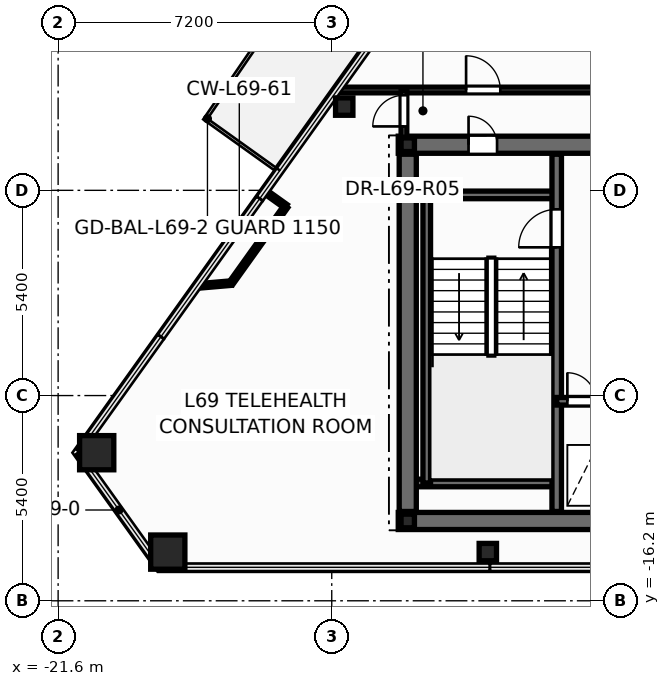
"""IFC4 building model, lengths in metres.
Left out: names, types, materials, properties, quantities, classifications, styles, units other than length and angle.
Written with IfcOpenShell. Run it as: python <this file> out.ifc"""

import sys

from ifc_helpers import new_model, si_unit, direction, frame, frame_2d, origin, origin_2d, place, context, subcontext, project, spatial, rectangle, hollow_rectangle, hollow_circle, i_section, extrude, element, fill, save


model = new_model("IFC4")
c1 = context("Model", 3, precision=1e-05, world=origin(), true_north=direction((0.0, 1.0)))
c2 = subcontext(c1, "Body", "Model", "MODEL_VIEW")
j1 = project(units=[si_unit("LENGTHUNIT", "METRE"), si_unit("PLANEANGLEUNIT", "RADIAN")], contexts=[c1])
p1 = place(None, origin())
s1 = spatial("IfcSite", under=j1, at=p1, CompositionType="ELEMENT")
p2 = place(p1, origin())
s2 = spatial("IfcBuilding", under=s1, at=p2, CompositionType="ELEMENT")
p3 = place(p2, frame((0.0, 0.0, 263.4)))
s3 = spatial("IfcBuildingStorey", under=s2, at=p3, CompositionType="ELEMENT", Elevation=263.4)
for number, where, z_axis, x_axis in (
    (1, (-20.585, -12.303, 0.0), (0.0, 0.0, 1.0), (1.0, 0.0, 0.0)),
    (2, (-18.714, -14.919, 0.0), (0.0, 0.0, 1.0), (1.0, 0.0, 0.0)),
):
    element("IfcColumn", number, at=place(p3, frame(where, z_axis=z_axis, x_axis=x_axis)), inside=s3, PredefinedType="COLUMN", context=c2, shape_type="SweptSolid", body=[
        extrude(hollow_rectangle(XDim=0.9, YDim=0.9, WallThickness=0.04, at=origin_2d()), origin(), (0.0, 0.0, 1.0), 3.6),
    ])
for number, where, z_axis, x_axis in (
    (3, (-10.293, -14.919, 0.0), (0.0, 0.0, 1.0), (1.0, 0.0, 0.0)),
    (4, (-14.072, -3.196, 0.0), (0.0, 0.0, 1.0), (1.0, 0.0, 0.0)),
):
    element("IfcColumn", number, at=place(p3, frame(where, z_axis=z_axis, x_axis=x_axis)), inside=s3, PredefinedType="COLUMN", context=c2, shape_type="SweptSolid", body=[
        extrude(hollow_circle(Radius=0.229, WallThickness=0.016, at=origin_2d()), origin(), (0.0, 0.0, 1.0), 3.6),
    ])
for number, where, z_axis, x_axis in (
    (5, (-12.4, -14.1, 0.0), (0.0, 0.0, 1.0), (1.0, 0.0, 0.0)),
    (6, (-12.4, -4.2, 0.0), (0.0, 0.0, 1.0), (1.0, 0.0, 0.0)),
):
    element("IfcColumn", number, at=place(p3, frame(where, z_axis=z_axis, x_axis=x_axis)), inside=s3, PredefinedType="COLUMN", context=c2, shape_type="SweptSolid", body=[
        extrude(i_section(OverallWidth=0.352, OverallDepth=0.359, WebThickness=0.018, FlangeThickness=0.026, at=origin_2d()), origin(), (0.0, 0.0, 1.0), 3.6),
    ])
p4 = place(p3, frame((-12.65, -14.1, 0.0), z_axis=(0.0, 0.0, 1.0), x_axis=(1.0, 0.0, 0.0)))
e7 = element("IfcWall", 7, at=p4, inside=s3, PredefinedType="SHEAR", context=c2, shape_type="SweptSolid", body=[
    extrude(rectangle(XDim=25.3, YDim=0.45, at=frame_2d((12.65, 0.0))), origin(), (0.0, 0.0, 1.0), 3.6),
])
p5 = place(p3, frame((-12.65, -4.2, 0.0), z_axis=(0.0, 0.0, 1.0), x_axis=(1.0, 0.0, 0.0)))
e8 = element("IfcWall", 8, at=p5, inside=s3, PredefinedType="SHEAR", context=c2, shape_type="SweptSolid", body=[
    extrude(rectangle(XDim=25.3, YDim=0.45, at=frame_2d((12.65, 0.0))), origin(), (0.0, 0.0, 1.0), 3.6),
])
p6 = place(p5, frame((1.85, 0.0, 0.0)))
e9 = element("IfcOpeningElement", 9, at=p6, cuts=e8, PredefinedType="OPENING", context=c2, shape_type="SweptSolid", body=[
    extrude(rectangle(XDim=0.756, YDim=2.054, at=frame_2d((0.375, 1.027))), frame((0.0, 0.235, 0.0), z_axis=(0.0, -1.0, 0.0), x_axis=(1.0, 0.0, 0.0)), (0.0, 0.0, 1.0), 0.47),
])
p7 = place(p5, frame((22.65, 0.0, 0.0)))
e10 = element("IfcOpeningElement", 10, at=p7, cuts=e8, PredefinedType="OPENING", context=c2, shape_type="SweptSolid", body=[
    extrude(rectangle(XDim=0.756, YDim=2.054, at=frame_2d((0.375, 1.027))), frame((0.0, 0.235, 0.0), z_axis=(0.0, -1.0, 0.0), x_axis=(1.0, 0.0, 0.0)), (0.0, 0.0, 1.0), 0.47),
])
p8 = place(p5, frame((5.85, 0.0, 0.0)))
e11 = element("IfcOpeningElement", 11, at=p8, cuts=e8, PredefinedType="OPENING", context=c2, shape_type="SweptSolid", body=[
    extrude(rectangle(XDim=1.006, YDim=2.104, at=frame_2d((0.5, 1.052))), frame((0.0, 0.235, 0.0), z_axis=(0.0, -1.0, 0.0), x_axis=(1.0, 0.0, 0.0)), (0.0, 0.0, 1.0), 0.47),
])
p9 = place(p5, frame((10.35, 0.0, 0.0)))
e12 = element("IfcOpeningElement", 12, at=p9, cuts=e8, PredefinedType="OPENING", context=c2, shape_type="SweptSolid", body=[
    extrude(rectangle(XDim=1.406, YDim=2.154, at=frame_2d((0.7, 1.077))), frame((0.0, 0.235, 0.0), z_axis=(0.0, -1.0, 0.0), x_axis=(1.0, 0.0, 0.0)), (0.0, 0.0, 1.0), 0.47),
])
p10 = place(p5, frame((18.45, 0.0, 0.0)))
e13 = element("IfcOpeningElement", 13, at=p10, cuts=e8, PredefinedType="OPENING", context=c2, shape_type="SweptSolid", body=[
    extrude(rectangle(XDim=1.006, YDim=2.104, at=frame_2d((0.5, 1.052))), frame((0.0, 0.235, 0.0), z_axis=(0.0, -1.0, 0.0), x_axis=(1.0, 0.0, 0.0)), (0.0, 0.0, 1.0), 0.47),
])
for number, where, z_axis, x_axis in (
    (14, (-12.35, -5.52, 0.0), (0.0, 0.0, 1.0), (1.0, 0.0, 0.0)),
    (15, (-12.35, -13.1, 0.0), (0.0, 0.0, 1.0), (1.0, 0.0, 0.0)),
):
    element("IfcWall", number, at=place(p3, frame(where, z_axis=z_axis, x_axis=x_axis)), inside=s3, PredefinedType="SOLIDWALL", context=c2, shape_type="SweptSolid", body=[
        extrude(rectangle(XDim=3.87, YDim=0.2, at=frame_2d((1.935, 0.0))), origin(), (0.0, 0.0, 1.0), 3.6),
    ])
p11 = place(p3, frame((-11.9, -13.1, 0.0), z_axis=(0.0, 0.0, 1.0), x_axis=(0.0, 1.0, 0.0)))
e16 = element("IfcWall", 16, at=p11, inside=s3, PredefinedType="SOLIDWALL", context=c2, shape_type="SweptSolid", body=[
    extrude(rectangle(XDim=7.58, YDim=0.2, at=frame_2d((3.79, 0.0))), origin(), (0.0, 0.0, 1.0), 3.6),
])
p12 = place(p3, frame((-8.48, -13.85, 0.0), z_axis=(0.0, 0.0, 1.0), x_axis=(0.0, 1.0, 0.0)))
e17 = element("IfcWall", 17, at=p12, inside=s3, PredefinedType="SHEAR", context=c2, shape_type="SweptSolid", body=[
    extrude(rectangle(XDim=9.4, YDim=0.25, at=frame_2d((4.7, 0.0))), origin(), (0.0, 0.0, 1.0), 3.6),
])
p13 = place(p12, frame((6.95, 0.0, 0.0)))
e18 = element("IfcOpeningElement", 18, at=p13, cuts=e17, PredefinedType="OPENING", context=c2, shape_type="SweptSolid", body=[
    extrude(rectangle(XDim=1.006, YDim=2.104, at=frame_2d((0.5, 1.052))), frame((0.0, 0.135, 0.0), z_axis=(0.0, -1.0, 0.0), x_axis=(1.0, 0.0, 0.0)), (0.0, 0.0, 1.0), 0.27),
])
p14 = place(p3, frame((-8.48, -10.95, 0.0), z_axis=(0.0, 0.0, 1.0), x_axis=(1.0, 0.0, 0.0)))
e19 = element("IfcWall", 19, at=p14, inside=s3, PredefinedType="SOLIDWALL", context=c2, shape_type="SweptSolid", body=[
    extrude(rectangle(XDim=3.36, YDim=0.2, at=frame_2d((1.68, 0.0))), origin(), (0.0, 0.0, 1.0), 3.6),
])
p15 = place(p14, frame((0.28, 0.0, 0.0)))
e20 = element("IfcOpeningElement", 20, at=p15, cuts=e19, PredefinedType="OPENING", context=c2, shape_type="SweptSolid", body=[
    extrude(rectangle(XDim=0.756, YDim=2.054, at=frame_2d((0.375, 1.027))), frame((0.0, 0.11, 0.0), z_axis=(0.0, -1.0, 0.0), x_axis=(1.0, 0.0, 0.0)), (0.0, 0.0, 1.0), 0.22),
])
p16 = place(p14, frame((1.85, 0.0, 0.0)))
e21 = element("IfcOpeningElement", 21, at=p16, cuts=e19, PredefinedType="OPENING", context=c2, shape_type="SweptSolid", body=[
    extrude(rectangle(XDim=1.106, YDim=2.104, at=frame_2d((0.55, 1.052))), frame((0.0, 0.11, 0.0), z_axis=(0.0, -1.0, 0.0), x_axis=(1.0, 0.0, 0.0)), (0.0, 0.0, 1.0), 0.22),
])
p17 = place(p3, frame((-12.4, -13.85, 0.0), z_axis=(0.0, 0.0, 1.0), x_axis=(0.0, 1.0, 0.0)))
e22 = element("IfcWall", 22, at=p17, inside=s3, PredefinedType="SHEAR", context=c2, shape_type="SweptSolid", body=[
    extrude(rectangle(XDim=9.4, YDim=0.45, at=frame_2d((4.7, 0.0))), origin(), (0.0, 0.0, 1.0), 3.6),
])
p18 = place(p3, frame((-14.251, -2.76, 0.0), z_axis=(0.0, 0.0, 1.0), x_axis=(1.0, 0.0, 0.0)))
e23 = element("IfcWall", 23, at=p18, inside=s3, PredefinedType="PARTITIONING", context=c2, shape_type="SweptSolid", body=[
    extrude(rectangle(XDim=9.351, YDim=0.15, at=frame_2d((4.676, 0.0))), origin(), (0.0, 0.0, 1.0), 2.32),
])
p19 = place(p18, frame((3.386, 0.0, 0.0)))
e24 = element("IfcOpeningElement", 24, at=p19, cuts=e23, PredefinedType="OPENING", context=c2, shape_type="SweptSolid", body=[
    extrude(rectangle(XDim=0.906, YDim=2.104, at=frame_2d((0.45, 1.052))), frame((0.0, 0.085, 0.0), z_axis=(0.0, -1.0, 0.0), x_axis=(1.0, 0.0, 0.0)), (0.0, 0.0, 1.0), 0.17),
])
p20 = place(p3, frame((-15.606, -5.824, 0.0), z_axis=(0.0, 0.0, 1.0), x_axis=(-0.581685079242, -0.813414081872, 0.0)))
e25 = element("IfcWall", 25, at=p20, inside=s3, PredefinedType="PARTITIONING", context=c2, shape_type="SweptSolid", body=[
    extrude(rectangle(XDim=2.48, YDim=0.12, at=frame_2d((1.24, 0.0))), origin(), (0.0, 0.0, 1.0), 3.345),
])
p21 = place(p3, frame((-12.5, -4.24, 0.0), z_axis=(0.0, 0.0, 1.0), x_axis=(0.0, 1.0, 0.0)))
e26 = element("IfcWall", 26, at=p21, inside=s3, PredefinedType="PARTITIONING", context=c2, shape_type="SweptSolid", body=[
    extrude(rectangle(XDim=1.48, YDim=0.15, at=frame_2d((0.74, 0.0))), origin(), (0.0, 0.0, 1.0), 2.32),
])
p22 = place(p21, frame((0.522, 0.0, 0.0)))
e27 = element("IfcOpeningElement", 27, at=p22, cuts=e26, PredefinedType="OPENING", context=c2, shape_type="SweptSolid", body=[
    extrude(rectangle(XDim=0.826, YDim=2.104, at=frame_2d((0.41, 1.052))), frame((0.0, 0.085, 0.0), z_axis=(0.0, -1.0, 0.0), x_axis=(1.0, 0.0, 0.0)), (0.0, 0.0, 1.0), 0.17),
])
p23 = place(p3, frame((-17.049, -7.841, 0.0), z_axis=(0.0, 0.0, 1.0), x_axis=(-0.996304768975, -0.085888342153, 0.0)))
e28 = element("IfcWall", 28, at=p23, inside=s3, PredefinedType="PARTITIONING", context=c2, shape_type="SweptSolid", body=[
    extrude(rectangle(XDim=0.881, YDim=0.12, at=frame_2d((0.44, 0.0))), origin(), (0.0, 0.0, 1.0), 2.863),
])
p24 = place(p3, frame((-16.151, -5.434, 0.0), z_axis=(0.0, 0.0, 1.0), x_axis=(0.813265440227, -0.581892879947, 0.0)))
e29 = element("IfcWall", 29, at=p24, inside=s3, PredefinedType="PARTITIONING", context=c2, shape_type="SweptSolid", body=[
    extrude(rectangle(XDim=0.67, YDim=0.12, at=frame_2d((0.335, 0.0))), origin(), (0.0, 0.0, 1.0), 2.863),
])
p25 = place(p13, origin())
e30 = element("IfcDoor", 30, at=p25, inside=s3, OperationType="SINGLE_SWING_LEFT", PredefinedType="DOOR", context=c2, shape_type="SweptSolid", body=[
    extrude(rectangle(XDim=1.0, YDim=2.1, at=frame_2d((0.5, 1.05))), frame((0.0, 0.025, 0.0), z_axis=(0.0, -1.0, 0.0), x_axis=(1.0, 0.0, 0.0)), (0.0, 0.0, 1.0), 0.05),
])
fill(e18, e30)
p26 = place(p15, origin())
e31 = element("IfcDoor", 31, at=p26, inside=s3, OperationType="SINGLE_SWING_LEFT", PredefinedType="DOOR", context=c2, shape_type="SweptSolid", body=[
    extrude(rectangle(XDim=0.75, YDim=2.05, at=frame_2d((0.375, 1.025))), frame((0.0, 0.025, 0.0), z_axis=(0.0, -1.0, 0.0), x_axis=(1.0, 0.0, 0.0)), (0.0, 0.0, 1.0), 0.05),
])
fill(e20, e31)
p27 = place(p6, origin())
e32 = element("IfcDoor", 32, at=p27, inside=s3, OperationType="SINGLE_SWING_LEFT", PredefinedType="DOOR", context=c2, shape_type="SweptSolid", body=[
    extrude(rectangle(XDim=0.75, YDim=2.05, at=frame_2d((0.375, 1.025))), frame((0.0, 0.025, 0.0), z_axis=(0.0, -1.0, 0.0), x_axis=(1.0, 0.0, 0.0)), (0.0, 0.0, 1.0), 0.05),
])
fill(e9, e32)
p28 = place(p22, origin())
e33 = element("IfcDoor", 33, at=p28, inside=s3, OperationType="SINGLE_SWING_LEFT", PredefinedType="DOOR", context=c2, shape_type="SweptSolid", body=[
    extrude(rectangle(XDim=0.82, YDim=2.1, at=frame_2d((0.41, 1.05))), frame((0.0, 0.025, 0.0), z_axis=(0.0, -1.0, 0.0), x_axis=(1.0, 0.0, 0.0)), (0.0, 0.0, 1.0), 0.05),
])
fill(e27, e33)
p29 = place(p19, origin())
e34 = element("IfcDoor", 34, at=p29, inside=s3, OperationType="SINGLE_SWING_LEFT", PredefinedType="DOOR", context=c2, shape_type="SweptSolid", body=[
    extrude(rectangle(XDim=0.9, YDim=2.1, at=frame_2d((0.45, 1.05))), frame((0.0, 0.025, 0.0), z_axis=(0.0, -1.0, 0.0), x_axis=(1.0, 0.0, 0.0)), (0.0, 0.0, 1.0), 0.05),
])
fill(e24, e34)
save(model, sys.argv[1])
